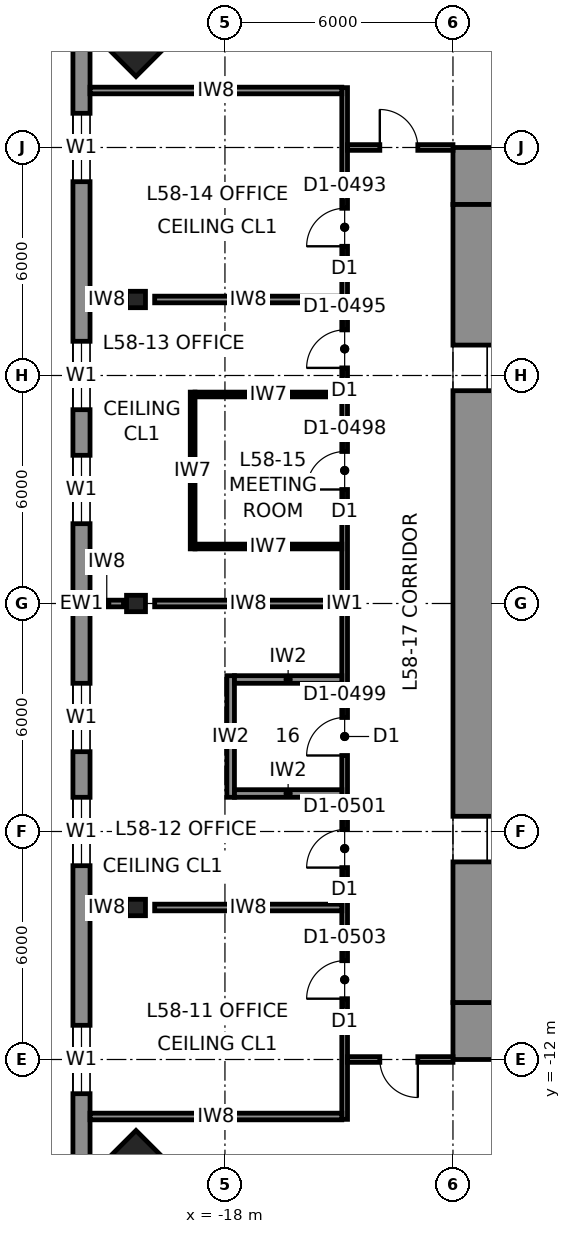
"""IFC4 building model, lengths in metres.
Left out: names, types, materials, properties, quantities, classifications, styles, units other than length and angle.
Written with IfcOpenShell. Run it as: python <this file> out.ifc"""

import sys

from ifc_helpers import new_model, si_unit, direction, frame, frame_2d, origin, origin_2d, place, context, subcontext, project, spatial, rectangle, i_section, extrude, element, fill, save


model = new_model("IFC4")
c1 = context("Model", 3, precision=1e-05, world=origin(), true_north=direction((0.0, 1.0)))
c2 = subcontext(c1, "Body", "Model", "MODEL_VIEW")
j1 = project(units=[si_unit("LENGTHUNIT", "METRE"), si_unit("PLANEANGLEUNIT", "RADIAN")], contexts=[c1])
p1 = place(None, origin())
s1 = spatial("IfcSite", under=j1, at=p1, CompositionType="ELEMENT")
p2 = place(p1, origin())
s2 = spatial("IfcBuilding", under=s1, at=p2, CompositionType="ELEMENT")
p3 = place(p2, frame((0.0, 0.0, 261.8)))
s3 = spatial("IfcBuildingStorey", under=s2, at=p3, CompositionType="ELEMENT", Elevation=261.8)
for number, where, z_axis, x_axis in (
    (1, (-20.34, -15.99, 0.0), (0.04, 0.04, 0.998), (-0.707, 0.708, 0.0)),
    (2, (-20.34, 15.99, 0.0), (0.04, -0.04, 0.998), (0.707, 0.708, 0.0)),
):
    element("IfcColumn", number, at=place(p3, frame(where, z_axis=z_axis, x_axis=x_axis)), inside=s3, PredefinedType="COLUMN", context=c2, shape_type="SweptSolid", body=[
        extrude(rectangle(XDim=3.0, YDim=3.0, at=origin_2d()), origin(), (0.0, 0.0, 1.0), 4.007),
    ])
for number, where, z_axis, x_axis in (
    (3, (-20.34, 0.0, 0.0), (0.04, 0.0, 0.999), (0.0, 1.0, 0.0)),
    (4, (-20.34, 8.0, 0.0), (0.04, 0.0, 0.999), (0.0, 1.0, 0.0)),
    (5, (-20.34, -8.0, 0.0), (0.04, 0.0, 0.999), (0.0, 1.0, 0.0)),
):
    element("IfcColumn", number, at=place(p3, frame(where, z_axis=z_axis, x_axis=x_axis)), inside=s3, PredefinedType="COLUMN", context=c2, shape_type="SweptSolid", body=[
        extrude(i_section(OverallWidth=0.432, OverallDepth=0.498, WebThickness=0.056, FlangeThickness=0.089, at=origin_2d()), origin(), (0.0, 0.0, 1.0), 4.003),
    ])
for number, where, z_axis, x_axis in (
    (6, (-12.0, 11.25, 0.0), (0.0, 0.0, 1.0), (1.0, 0.0, 0.0)),
    (7, (12.0, -11.25, 0.0), (0.0, 0.0, 1.0), (-1.0, 0.0, 0.0)),
):
    element("IfcWall", number, at=place(p3, frame(where, z_axis=z_axis, x_axis=x_axis)), inside=s3, PredefinedType="SHEAR", context=c2, shape_type="SweptSolid", body=[
        extrude(rectangle(XDim=24.0, YDim=1.5, at=frame_2d((12.0, 0.0))), origin(), (0.0, 0.0, 1.0), 4.0),
    ])
p4 = place(p3, frame((-11.25, -10.5, 0.0), z_axis=(0.0, 0.0, 1.0), x_axis=(0.0, 1.0, 0.0)))
e8 = element("IfcWall", 8, at=p4, inside=s3, PredefinedType="SHEAR", context=c2, shape_type="SweptSolid", body=[
    extrude(rectangle(XDim=21.0, YDim=1.5, at=frame_2d((10.5, 0.0))), origin(), (0.0, 0.0, 1.0), 4.0),
])
p5 = place(p4, frame((16.1, 0.0, 0.0)))
e9 = element("IfcOpeningElement", 9, at=p5, cuts=e8, PredefinedType="OPENING", context=c2, shape_type="SweptSolid", body=[
    extrude(rectangle(XDim=1.2, YDim=2.3, at=frame_2d((0.6, 1.15))), frame((0.0, 0.76, 0.0), z_axis=(0.0, -1.0, 0.0), x_axis=(1.0, 0.0, 0.0)), (0.0, 0.0, 1.0), 1.52),
])
p6 = place(p4, frame((3.7, 0.0, 0.0)))
e10 = element("IfcOpeningElement", 10, at=p6, cuts=e8, PredefinedType="OPENING", context=c2, shape_type="SweptSolid", body=[
    extrude(rectangle(XDim=1.2, YDim=2.3, at=frame_2d((0.6, 1.15))), frame((0.0, 0.76, 0.0), z_axis=(0.0, -1.0, 0.0), x_axis=(1.0, 0.0, 0.0)), (0.0, 0.0, 1.0), 1.52),
])
p7 = place(p3, frame((-21.775, 17.5, 0.0), z_axis=(0.0, 0.0, 1.0), x_axis=(0.0, -1.0, 0.0)))
e11 = element("IfcWall", 11, at=p7, inside=s3, PredefinedType="SOLIDWALL", context=c2, shape_type="SweptSolid", body=[
    extrude(rectangle(XDim=35.0, YDim=0.45, at=frame_2d((17.5, 0.0))), origin(), (0.0, 0.0, 1.0), 3.83),
])
p8 = place(p7, frame((4.6, 0.0, 0.7)))
e12 = element("IfcOpeningElement", 12, at=p8, cuts=e11, PredefinedType="OPENING", context=c2, shape_type="SweptSolid", body=[
    extrude(rectangle(XDim=1.8, YDim=2.6, at=frame_2d((0.9, 1.3))), frame((0.0, 0.235, 0.0), z_axis=(0.0, -1.0, 0.0), x_axis=(1.0, 0.0, 0.0)), (0.0, 0.0, 1.0), 0.47),
])
p9 = place(p7, frame((10.6, 0.0, 0.7)))
e13 = element("IfcOpeningElement", 13, at=p9, cuts=e11, PredefinedType="OPENING", context=c2, shape_type="SweptSolid", body=[
    extrude(rectangle(XDim=1.8, YDim=2.6, at=frame_2d((0.9, 1.3))), frame((0.0, 0.235, 0.0), z_axis=(0.0, -1.0, 0.0), x_axis=(1.0, 0.0, 0.0)), (0.0, 0.0, 1.0), 0.47),
])
p10 = place(p7, frame((13.6, 0.0, 0.7)))
e14 = element("IfcOpeningElement", 14, at=p10, cuts=e11, PredefinedType="OPENING", context=c2, shape_type="SweptSolid", body=[
    extrude(rectangle(XDim=1.8, YDim=2.6, at=frame_2d((0.9, 1.3))), frame((0.0, 0.235, 0.0), z_axis=(0.0, -1.0, 0.0), x_axis=(1.0, 0.0, 0.0)), (0.0, 0.0, 1.0), 0.47),
])
p11 = place(p7, frame((19.6, 0.0, 0.7)))
e15 = element("IfcOpeningElement", 15, at=p11, cuts=e11, PredefinedType="OPENING", context=c2, shape_type="SweptSolid", body=[
    extrude(rectangle(XDim=1.8, YDim=2.6, at=frame_2d((0.9, 1.3))), frame((0.0, 0.235, 0.0), z_axis=(0.0, -1.0, 0.0), x_axis=(1.0, 0.0, 0.0)), (0.0, 0.0, 1.0), 0.47),
])
p12 = place(p7, frame((22.6, 0.0, 0.7)))
e16 = element("IfcOpeningElement", 16, at=p12, cuts=e11, PredefinedType="OPENING", context=c2, shape_type="SweptSolid", body=[
    extrude(rectangle(XDim=1.8, YDim=2.6, at=frame_2d((0.9, 1.3))), frame((0.0, 0.235, 0.0), z_axis=(0.0, -1.0, 0.0), x_axis=(1.0, 0.0, 0.0)), (0.0, 0.0, 1.0), 0.47),
])
p13 = place(p7, frame((28.6, 0.0, 0.7)))
e17 = element("IfcOpeningElement", 17, at=p13, cuts=e11, PredefinedType="OPENING", context=c2, shape_type="SweptSolid", body=[
    extrude(rectangle(XDim=1.8, YDim=2.6, at=frame_2d((0.9, 1.3))), frame((0.0, 0.235, 0.0), z_axis=(0.0, -1.0, 0.0), x_axis=(1.0, 0.0, 0.0)), (0.0, 0.0, 1.0), 0.47),
])
p14 = place(p3, frame((-14.85, 13.575, 0.0), z_axis=(0.0, 0.0, 1.0), x_axis=(0.0, -1.0, 0.0)))
e18 = element("IfcWall", 18, at=p14, inside=s3, PredefinedType="PARTITIONING", context=c2, shape_type="SweptSolid", body=[
    extrude(rectangle(XDim=27.15, YDim=0.15, at=frame_2d((13.575, 0.0))), origin(), (0.0, 0.0, 1.0), 3.83),
])
p15 = place(p14, frame((22.975, 0.0, 0.0)))
e19 = element("IfcOpeningElement", 19, at=p15, cuts=e18, PredefinedType="OPENING", context=c2, shape_type="SweptSolid", body=[
    extrude(rectangle(XDim=1.0, YDim=2.3, at=frame_2d((0.5, 1.15))), frame((0.0, 0.085, 0.0), z_axis=(0.0, -1.0, 0.0), x_axis=(1.0, 0.0, 0.0)), (0.0, 0.0, 1.0), 0.17),
])
p16 = place(p14, frame((19.525, 0.0, 0.0)))
e20 = element("IfcOpeningElement", 20, at=p16, cuts=e18, PredefinedType="OPENING", context=c2, shape_type="SweptSolid", body=[
    extrude(rectangle(XDim=1.0, YDim=2.3, at=frame_2d((0.5, 1.15))), frame((0.0, 0.085, 0.0), z_axis=(0.0, -1.0, 0.0), x_axis=(1.0, 0.0, 0.0)), (0.0, 0.0, 1.0), 0.17),
])
p17 = place(p14, frame((6.375, 0.0, 0.0)))
e21 = element("IfcOpeningElement", 21, at=p17, cuts=e18, PredefinedType="OPENING", context=c2, shape_type="SweptSolid", body=[
    extrude(rectangle(XDim=1.0, YDim=2.3, at=frame_2d((0.5, 1.15))), frame((0.0, 0.085, 0.0), z_axis=(0.0, -1.0, 0.0), x_axis=(1.0, 0.0, 0.0)), (0.0, 0.0, 1.0), 0.17),
])
p18 = place(p14, frame((3.175, 0.0, 0.0)))
e22 = element("IfcOpeningElement", 22, at=p18, cuts=e18, PredefinedType="OPENING", context=c2, shape_type="SweptSolid", body=[
    extrude(rectangle(XDim=1.0, YDim=2.3, at=frame_2d((0.5, 1.15))), frame((0.0, 0.085, 0.0), z_axis=(0.0, -1.0, 0.0), x_axis=(1.0, 0.0, 0.0)), (0.0, 0.0, 1.0), 0.17),
])
p19 = place(p14, frame((9.575, 0.0, 0.0)))
e23 = element("IfcOpeningElement", 23, at=p19, cuts=e18, PredefinedType="OPENING", context=c2, shape_type="SweptSolid", body=[
    extrude(rectangle(XDim=1.0, YDim=2.3, at=frame_2d((0.5, 1.15))), frame((0.0, 0.085, 0.0), z_axis=(0.0, -1.0, 0.0), x_axis=(1.0, 0.0, 0.0)), (0.0, 0.0, 1.0), 0.17),
])
p20 = place(p14, frame((16.575, 0.0, 0.0)))
e24 = element("IfcOpeningElement", 24, at=p20, cuts=e18, PredefinedType="OPENING", context=c2, shape_type="SweptSolid", body=[
    extrude(rectangle(XDim=1.0, YDim=2.3, at=frame_2d((0.5, 1.15))), frame((0.0, 0.085, 0.0), z_axis=(0.0, -1.0, 0.0), x_axis=(1.0, 0.0, 0.0)), (0.0, 0.0, 1.0), 0.17),
])
p21 = place(p3, frame((-14.775, 12.0, 0.0), z_axis=(0.0, 0.0, 1.0), x_axis=(1.0, 0.0, 0.0)))
e25 = element("IfcWall", 25, at=p21, inside=s3, PredefinedType="PARTITIONING", context=c2, shape_type="SweptSolid", body=[
    extrude(rectangle(XDim=2.775, YDim=0.15, at=frame_2d((1.387, 0.0))), origin(), (0.0, 0.0, 1.0), 3.83),
])
p22 = place(p21, frame((0.85, 0.0, 0.0)))
e26 = element("IfcOpeningElement", 26, at=p22, cuts=e25, PredefinedType="OPENING", context=c2, shape_type="SweptSolid", body=[
    extrude(rectangle(XDim=1.0, YDim=2.3, at=frame_2d((0.5, 1.15))), frame((0.0, 0.085, 0.0), z_axis=(0.0, -1.0, 0.0), x_axis=(1.0, 0.0, 0.0)), (0.0, 0.0, 1.0), 0.17),
])
p23 = place(p3, frame((-12.0, -12.0, 0.0), z_axis=(0.0, 0.0, 1.0), x_axis=(-1.0, 0.0, 0.0)))
e27 = element("IfcWall", 27, at=p23, inside=s3, PredefinedType="PARTITIONING", context=c2, shape_type="SweptSolid", body=[
    extrude(rectangle(XDim=2.775, YDim=0.15, at=frame_2d((1.387, 0.0))), origin(), (0.0, 0.0, 1.0), 3.83),
])
p24 = place(p23, frame((0.925, 0.0, 0.0)))
e28 = element("IfcOpeningElement", 28, at=p24, cuts=e27, PredefinedType="OPENING", context=c2, shape_type="SweptSolid", body=[
    extrude(rectangle(XDim=1.0, YDim=2.3, at=frame_2d((0.5, 1.15))), frame((0.0, 0.085, 0.0), z_axis=(0.0, -1.0, 0.0), x_axis=(1.0, 0.0, 0.0)), (0.0, 0.0, 1.0), 0.17),
])
for number, where, z_axis, x_axis in (
    (29, (-21.55, 13.5, 0.0), (0.0, 0.0, 1.0), (1.0, 0.0, 0.0)),
    (30, (-14.925, -13.5, 0.0), (0.0, 0.0, 1.0), (-1.0, 0.0, 0.0)),
):
    element("IfcWall", number, at=place(p3, frame(where, z_axis=z_axis, x_axis=x_axis)), inside=s3, PredefinedType="PARTITIONING", context=c2, shape_type="SweptSolid", body=[
        extrude(rectangle(XDim=6.625, YDim=0.175, at=frame_2d((3.312, 0.0))), origin(), (0.0, 0.0, 1.0), 3.83),
    ])
p25 = place(p3, frame((-14.925, -8.0, 0.0), z_axis=(0.0, 0.0, 1.0), x_axis=(-1.0, 0.0, 0.0)))
e31 = element("IfcWall", 31, at=p25, inside=s3, PredefinedType="PARTITIONING", context=c2, shape_type="SweptSolid", body=[
    extrude(rectangle(XDim=4.924, YDim=0.175, at=frame_2d((2.462, 0.0))), origin(), (0.0, 0.0, 1.0), 3.14),
])
p26 = place(p3, frame((-20.67, -8.0, 0.0), z_axis=(0.0, 0.0, 1.0), x_axis=(-1.0, 0.0, 0.0)))
e32 = element("IfcWall", 32, at=p26, inside=s3, PredefinedType="PARTITIONING", context=c2, shape_type="SweptSolid", body=[
    extrude(rectangle(XDim=0.88, YDim=0.175, at=frame_2d((0.44, 0.0))), origin(), (0.0, 0.0, 1.0), 3.83),
])
p27 = place(p3, frame((-14.925, 0.0, 0.0), z_axis=(0.0, 0.0, 1.0), x_axis=(-1.0, 0.0, 0.0)))
e33 = element("IfcWall", 33, at=p27, inside=s3, PredefinedType="PARTITIONING", context=c2, shape_type="SweptSolid", body=[
    extrude(rectangle(XDim=4.924, YDim=0.175, at=frame_2d((2.462, 0.0))), origin(), (0.0, 0.0, 1.0), 3.14),
])
p28 = place(p3, frame((-20.67, 0.0, 0.0), z_axis=(0.0, 0.0, 1.0), x_axis=(-1.0, 0.0, 0.0)))
e34 = element("IfcWall", 34, at=p28, inside=s3, PredefinedType="PARTITIONING", context=c2, shape_type="SweptSolid", body=[
    extrude(rectangle(XDim=0.88, YDim=0.175, at=frame_2d((0.44, 0.0))), origin(), (0.0, 0.0, 1.0), 3.83),
])
p29 = place(p3, frame((-14.925, 8.0, 0.0), z_axis=(0.0, 0.0, 1.0), x_axis=(-1.0, 0.0, 0.0)))
e35 = element("IfcWall", 35, at=p29, inside=s3, PredefinedType="PARTITIONING", context=c2, shape_type="SweptSolid", body=[
    extrude(rectangle(XDim=4.924, YDim=0.175, at=frame_2d((2.462, 0.0))), origin(), (0.0, 0.0, 1.0), 3.14),
])
p30 = place(p3, frame((-20.67, 8.0, 0.0), z_axis=(0.0, 0.0, 1.0), x_axis=(-1.0, 0.0, 0.0)))
e36 = element("IfcWall", 36, at=p30, inside=s3, PredefinedType="PARTITIONING", context=c2, shape_type="SweptSolid", body=[
    extrude(rectangle(XDim=0.88, YDim=0.175, at=frame_2d((0.44, 0.0))), origin(), (0.0, 0.0, 1.0), 3.83),
])
p31 = place(p3, frame((-18.85, 1.438, 0.0), z_axis=(0.0, 0.0, 1.0), x_axis=(0.0, 1.0, 0.0)))
e37 = element("IfcWall", 37, at=p31, inside=s3, PredefinedType="PARTITIONING", context=c2, shape_type="SweptSolid", body=[
    extrude(rectangle(XDim=4.125, YDim=0.125, at=frame_2d((2.062, 0.0))), origin(), (0.0, 0.0, 1.0), 3.83),
])
for number, where, z_axis, x_axis in (
    (38, (-14.925, 1.5, 0.0), (0.0, 0.0, 1.0), (-1.0, 0.0, 0.0)),
    (39, (-14.925, 5.5, 0.0), (0.0, 0.0, 1.0), (-1.0, 0.0, 0.0)),
):
    element("IfcWall", number, at=place(p3, frame(where, z_axis=z_axis, x_axis=x_axis)), inside=s3, PredefinedType="PARTITIONING", context=c2, shape_type="SweptSolid", body=[
        extrude(rectangle(XDim=3.863, YDim=0.125, at=frame_2d((1.931, 0.0))), origin(), (0.0, 0.0, 1.0), 3.83),
    ])
p32 = place(p3, frame((-17.85, -5.1, 0.0), z_axis=(0.0, 0.0, 1.0), x_axis=(0.0, 1.0, 0.0)))
e40 = element("IfcWall", 40, at=p32, inside=s3, PredefinedType="PARTITIONING", context=c2, shape_type="SweptSolid", body=[
    extrude(rectangle(XDim=3.2, YDim=0.2, at=frame_2d((1.6, 0.0))), origin(), (0.0, 0.0, 1.0), 3.83),
])
for number, where, z_axis, x_axis in (
    (41, (-14.925, -5.0, 0.0), (0.0, 0.0, 1.0), (-1.0, 0.0, 0.0)),
    (42, (-14.925, -2.0, 0.0), (0.0, 0.0, 1.0), (-1.0, 0.0, 0.0)),
):
    element("IfcWall", number, at=place(p3, frame(where, z_axis=z_axis, x_axis=x_axis)), inside=s3, PredefinedType="PARTITIONING", context=c2, shape_type="SweptSolid", body=[
        extrude(rectangle(XDim=2.825, YDim=0.2, at=frame_2d((1.413, 0.0))), origin(), (0.0, 0.0, 1.0), 3.83),
    ])
p33 = place(p8, origin())
e43 = element("IfcWindow", 43, at=p33, inside=s3, PartitioningType="SINGLE_PANEL", PredefinedType="WINDOW", context=c2, shape_type="SweptSolid", body=[
    extrude(rectangle(XDim=1.8, YDim=2.6, at=frame_2d((0.9, 1.3))), frame((0.0, 0.03, 0.0), z_axis=(0.0, -1.0, 0.0), x_axis=(1.0, 0.0, 0.0)), (0.0, 0.0, 1.0), 0.06),
])
fill(e12, e43)
p34 = place(p9, origin())
e44 = element("IfcWindow", 44, at=p34, inside=s3, PartitioningType="SINGLE_PANEL", PredefinedType="WINDOW", context=c2, shape_type="SweptSolid", body=[
    extrude(rectangle(XDim=1.8, YDim=2.6, at=frame_2d((0.9, 1.3))), frame((0.0, 0.03, 0.0), z_axis=(0.0, -1.0, 0.0), x_axis=(1.0, 0.0, 0.0)), (0.0, 0.0, 1.0), 0.06),
])
fill(e13, e44)
p35 = place(p10, origin())
e45 = element("IfcWindow", 45, at=p35, inside=s3, PartitioningType="SINGLE_PANEL", PredefinedType="WINDOW", context=c2, shape_type="SweptSolid", body=[
    extrude(rectangle(XDim=1.8, YDim=2.6, at=frame_2d((0.9, 1.3))), frame((0.0, 0.03, 0.0), z_axis=(0.0, -1.0, 0.0), x_axis=(1.0, 0.0, 0.0)), (0.0, 0.0, 1.0), 0.06),
])
fill(e14, e45)
p36 = place(p11, origin())
e46 = element("IfcWindow", 46, at=p36, inside=s3, PartitioningType="SINGLE_PANEL", PredefinedType="WINDOW", context=c2, shape_type="SweptSolid", body=[
    extrude(rectangle(XDim=1.8, YDim=2.6, at=frame_2d((0.9, 1.3))), frame((0.0, 0.03, 0.0), z_axis=(0.0, -1.0, 0.0), x_axis=(1.0, 0.0, 0.0)), (0.0, 0.0, 1.0), 0.06),
])
fill(e15, e46)
p37 = place(p12, origin())
e47 = element("IfcWindow", 47, at=p37, inside=s3, PartitioningType="SINGLE_PANEL", PredefinedType="WINDOW", context=c2, shape_type="SweptSolid", body=[
    extrude(rectangle(XDim=1.8, YDim=2.6, at=frame_2d((0.9, 1.3))), frame((0.0, 0.03, 0.0), z_axis=(0.0, -1.0, 0.0), x_axis=(1.0, 0.0, 0.0)), (0.0, 0.0, 1.0), 0.06),
])
fill(e16, e47)
p38 = place(p13, origin())
e48 = element("IfcWindow", 48, at=p38, inside=s3, PartitioningType="SINGLE_PANEL", PredefinedType="WINDOW", context=c2, shape_type="SweptSolid", body=[
    extrude(rectangle(XDim=1.8, YDim=2.6, at=frame_2d((0.9, 1.3))), frame((0.0, 0.03, 0.0), z_axis=(0.0, -1.0, 0.0), x_axis=(1.0, 0.0, 0.0)), (0.0, 0.0, 1.0), 0.06),
])
fill(e17, e48)
p39 = place(p22, origin())
e49 = element("IfcDoor", 49, at=p39, inside=s3, OperationType="SINGLE_SWING_LEFT", PredefinedType="DOOR", context=c2, shape_type="SweptSolid", body=[
    extrude(rectangle(XDim=1.0, YDim=2.3, at=frame_2d((0.5, 1.15))), frame((0.0, 0.025, 0.0), z_axis=(0.0, -1.0, 0.0), x_axis=(1.0, 0.0, 0.0)), (0.0, 0.0, 1.0), 0.05),
])
fill(e26, e49)
p40 = place(p24, origin())
e50 = element("IfcDoor", 50, at=p40, inside=s3, OperationType="SINGLE_SWING_LEFT", PredefinedType="DOOR", context=c2, shape_type="SweptSolid", body=[
    extrude(rectangle(XDim=1.0, YDim=2.3, at=frame_2d((0.5, 1.15))), frame((0.0, 0.025, 0.0), z_axis=(0.0, -1.0, 0.0), x_axis=(1.0, 0.0, 0.0)), (0.0, 0.0, 1.0), 0.05),
])
fill(e28, e50)
p41 = place(p15, frame((1.0, 0.0, 0.0), z_axis=(0.0, 0.0, 1.0), x_axis=(-1.0, 0.0, 0.0)))
e51 = element("IfcDoor", 51, at=p41, inside=s3, OperationType="SINGLE_SWING_LEFT", PredefinedType="DOOR", context=c2, shape_type="SweptSolid", body=[
    extrude(rectangle(XDim=1.0, YDim=2.3, at=frame_2d((0.5, 1.15))), frame((0.0, 0.025, 0.0), z_axis=(0.0, -1.0, 0.0), x_axis=(1.0, 0.0, 0.0)), (0.0, 0.0, 1.0), 0.05),
])
fill(e19, e51)
p42 = place(p16, frame((1.0, 0.0, 0.0), z_axis=(0.0, 0.0, 1.0), x_axis=(-1.0, 0.0, 0.0)))
e52 = element("IfcDoor", 52, at=p42, inside=s3, OperationType="SINGLE_SWING_LEFT", PredefinedType="DOOR", context=c2, shape_type="SweptSolid", body=[
    extrude(rectangle(XDim=1.0, YDim=2.3, at=frame_2d((0.5, 1.15))), frame((0.0, 0.025, 0.0), z_axis=(0.0, -1.0, 0.0), x_axis=(1.0, 0.0, 0.0)), (0.0, 0.0, 1.0), 0.05),
])
fill(e20, e52)
p43 = place(p17, frame((1.0, 0.0, 0.0), z_axis=(0.0, 0.0, 1.0), x_axis=(-1.0, 0.0, 0.0)))
e53 = element("IfcDoor", 53, at=p43, inside=s3, OperationType="SINGLE_SWING_LEFT", PredefinedType="DOOR", context=c2, shape_type="SweptSolid", body=[
    extrude(rectangle(XDim=1.0, YDim=2.3, at=frame_2d((0.5, 1.15))), frame((0.0, 0.025, 0.0), z_axis=(0.0, -1.0, 0.0), x_axis=(1.0, 0.0, 0.0)), (0.0, 0.0, 1.0), 0.05),
])
fill(e21, e53)
p44 = place(p18, frame((1.0, 0.0, 0.0), z_axis=(0.0, 0.0, 1.0), x_axis=(-1.0, 0.0, 0.0)))
e54 = element("IfcDoor", 54, at=p44, inside=s3, OperationType="SINGLE_SWING_LEFT", PredefinedType="DOOR", context=c2, shape_type="SweptSolid", body=[
    extrude(rectangle(XDim=1.0, YDim=2.3, at=frame_2d((0.5, 1.15))), frame((0.0, 0.025, 0.0), z_axis=(0.0, -1.0, 0.0), x_axis=(1.0, 0.0, 0.0)), (0.0, 0.0, 1.0), 0.05),
])
fill(e22, e54)
p45 = place(p19, frame((1.0, 0.0, 0.0), z_axis=(0.0, 0.0, 1.0), x_axis=(-1.0, 0.0, 0.0)))
e55 = element("IfcDoor", 55, at=p45, inside=s3, OperationType="SINGLE_SWING_LEFT", PredefinedType="DOOR", context=c2, shape_type="SweptSolid", body=[
    extrude(rectangle(XDim=1.0, YDim=2.3, at=frame_2d((0.5, 1.15))), frame((0.0, 0.025, 0.0), z_axis=(0.0, -1.0, 0.0), x_axis=(1.0, 0.0, 0.0)), (0.0, 0.0, 1.0), 0.05),
])
fill(e23, e55)
p46 = place(p20, frame((1.0, 0.0, 0.0), z_axis=(0.0, 0.0, 1.0), x_axis=(-1.0, 0.0, 0.0)))
e56 = element("IfcDoor", 56, at=p46, inside=s3, OperationType="SINGLE_SWING_LEFT", PredefinedType="DOOR", context=c2, shape_type="SweptSolid", body=[
    extrude(rectangle(XDim=1.0, YDim=2.3, at=frame_2d((0.5, 1.15))), frame((0.0, 0.025, 0.0), z_axis=(0.0, -1.0, 0.0), x_axis=(1.0, 0.0, 0.0)), (0.0, 0.0, 1.0), 0.05),
])
fill(e24, e56)
p47 = place(p5, frame((1.2, 0.0, 0.0), z_axis=(0.0, 0.0, 1.0), x_axis=(-1.0, 0.0, 0.0)))
e57 = element("IfcDoor", 57, at=p47, inside=s3, OperationType="SINGLE_SWING_LEFT", PredefinedType="DOOR", context=c2, shape_type="SweptSolid", body=[
    extrude(rectangle(XDim=1.2, YDim=2.3, at=frame_2d((0.6, 1.15))), frame((0.0, 0.025, 0.0), z_axis=(0.0, -1.0, 0.0), x_axis=(1.0, 0.0, 0.0)), (0.0, 0.0, 1.0), 0.05),
])
fill(e9, e57)
p48 = place(p6, frame((1.2, 0.0, 0.0), z_axis=(0.0, 0.0, 1.0), x_axis=(-1.0, 0.0, 0.0)))
e58 = element("IfcDoor", 58, at=p48, inside=s3, OperationType="SINGLE_SWING_LEFT", PredefinedType="DOOR", context=c2, shape_type="SweptSolid", body=[
    extrude(rectangle(XDim=1.2, YDim=2.3, at=frame_2d((0.6, 1.15))), frame((0.0, 0.025, 0.0), z_axis=(0.0, -1.0, 0.0), x_axis=(1.0, 0.0, 0.0)), (0.0, 0.0, 1.0), 0.05),
])
fill(e10, e58)
save(model, sys.argv[1])
